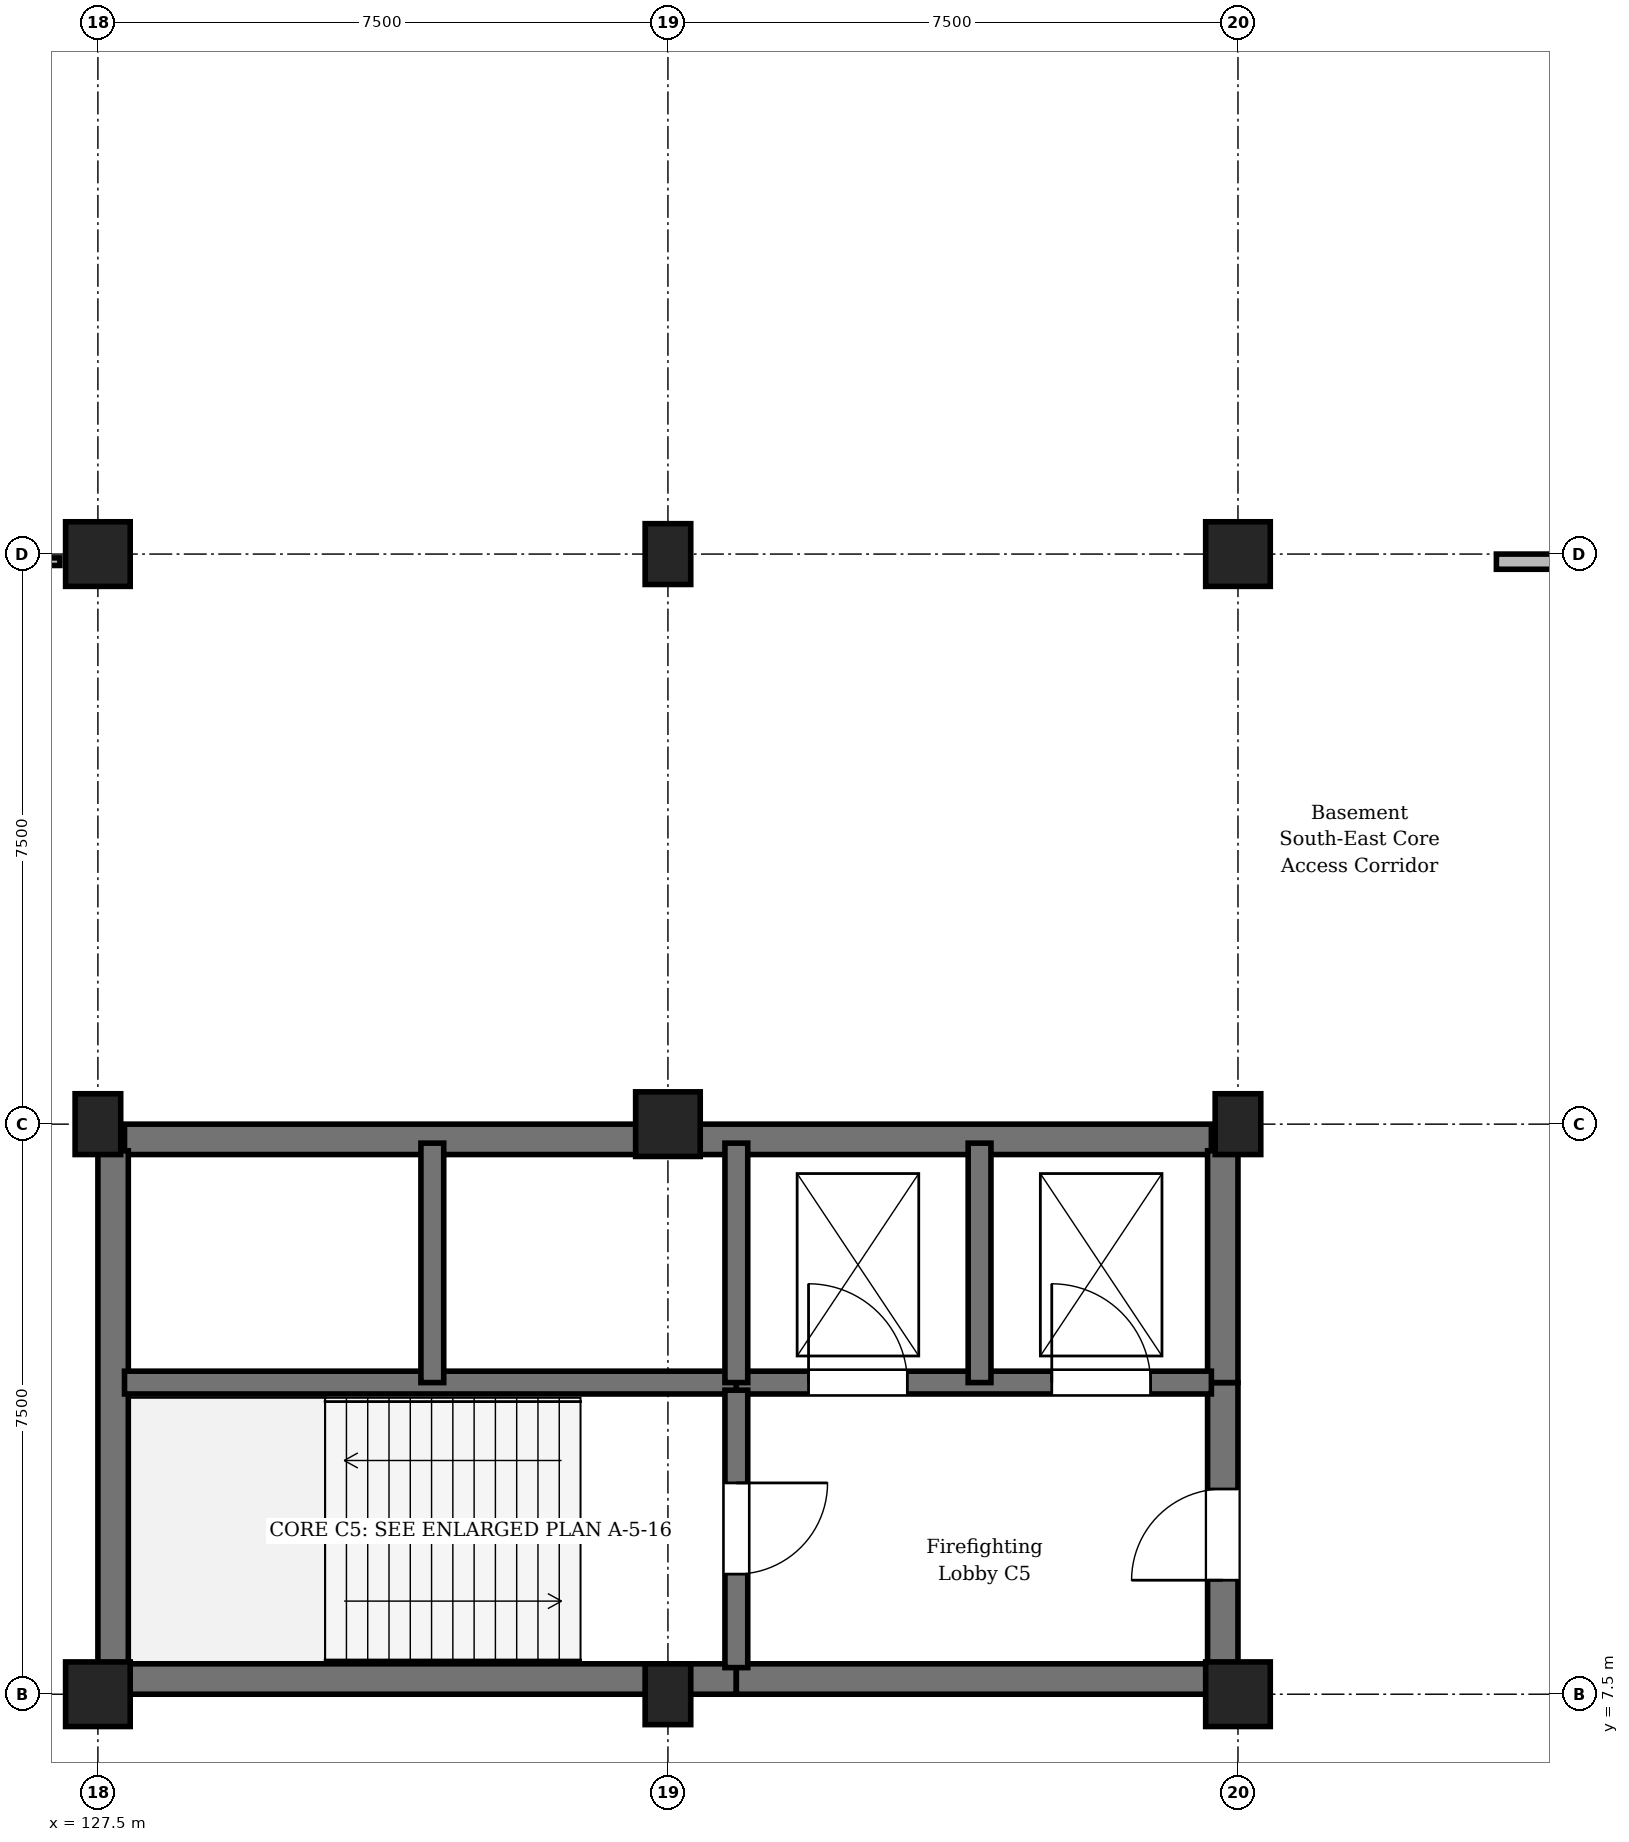
"""IFC4 building model, lengths in metres.
Left out: names, types, materials, properties, quantities, classifications, styles, units other than length and angle.
Written with IfcOpenShell. Run it as: python <this file> out.ifc"""

import sys

from ifc_helpers import new_model, si_unit, direction, frame, frame_2d, origin, origin_2d, place, context, subcontext, project, spatial, rectangle, extrude, element, fill, save


model = new_model("IFC4")
c1 = context("Model", 3, precision=1e-05, world=origin(), true_north=direction((0.0, 1.0)))
c2 = subcontext(c1, "Body", "Model", "MODEL_VIEW")
j1 = project(units=[si_unit("LENGTHUNIT", "METRE"), si_unit("PLANEANGLEUNIT", "RADIAN")], contexts=[c1])
p1 = place(None, origin())
s1 = spatial("IfcSite", under=j1, at=p1, CompositionType="ELEMENT")
p2 = place(p1, origin())
s2 = spatial("IfcBuilding", under=s1, at=p2, CompositionType="ELEMENT")
p3 = place(p2, frame((0.0, 0.0, -4.5)))
s3 = spatial("IfcBuildingStorey", under=s2, at=p3, CompositionType="ELEMENT", Elevation=-4.5)
p4 = place(p3, frame((127.5, 7.5, 0.0), z_axis=(0.0, 0.0, 1.0), x_axis=(1.0, 0.0, 0.0)))
e1 = element("IfcColumn", 1, at=p4, inside=s3, PredefinedType="COLUMN", context=c2, shape_type="SweptSolid", body=[
    extrude(rectangle(XDim=0.85, YDim=0.85, at=origin_2d()), origin(), (0.0, 0.0, 1.0), 4.5),
])
p5 = place(p3, frame((127.5, 15.0, 0.0), z_axis=(0.0, 0.0, 1.0), x_axis=(1.0, 0.0, 0.0)))
e2 = element("IfcColumn", 2, at=p5, inside=s3, PredefinedType="COLUMN", context=c2, shape_type="SweptSolid", body=[
    extrude(rectangle(XDim=0.6, YDim=0.8, at=origin_2d()), origin(), (0.0, 0.0, 1.0), 4.5),
])
p6 = place(p3, frame((127.5, 22.5, 0.0), z_axis=(0.0, 0.0, 1.0), x_axis=(1.0, 0.0, 0.0)))
e3 = element("IfcColumn", 3, at=p6, inside=s3, PredefinedType="COLUMN", context=c2, shape_type="SweptSolid", body=[
    extrude(rectangle(XDim=0.85, YDim=0.85, at=origin_2d()), origin(), (0.0, 0.0, 1.0), 4.5),
])
p7 = place(p3, frame((135.0, 7.5, 0.0), z_axis=(0.0, 0.0, 1.0), x_axis=(1.0, 0.0, 0.0)))
e4 = element("IfcColumn", 4, at=p7, inside=s3, PredefinedType="COLUMN", context=c2, shape_type="SweptSolid", body=[
    extrude(rectangle(XDim=0.6, YDim=0.8, at=origin_2d()), origin(), (0.0, 0.0, 1.0), 4.5),
])
p8 = place(p3, frame((135.0, 15.0, 0.0), z_axis=(0.0, 0.0, 1.0), x_axis=(1.0, 0.0, 0.0)))
e5 = element("IfcColumn", 5, at=p8, inside=s3, PredefinedType="COLUMN", context=c2, shape_type="SweptSolid", body=[
    extrude(rectangle(XDim=0.85, YDim=0.85, at=origin_2d()), origin(), (0.0, 0.0, 1.0), 4.5),
])
p9 = place(p3, frame((135.0, 22.5, 0.0), z_axis=(0.0, 0.0, 1.0), x_axis=(1.0, 0.0, 0.0)))
e6 = element("IfcColumn", 6, at=p9, inside=s3, PredefinedType="COLUMN", context=c2, shape_type="SweptSolid", body=[
    extrude(rectangle(XDim=0.6, YDim=0.8, at=origin_2d()), origin(), (0.0, 0.0, 1.0), 4.5),
])
p10 = place(p3, frame((142.5, 7.5, 0.0), z_axis=(0.0, 0.0, 1.0), x_axis=(1.0, 0.0, 0.0)))
e7 = element("IfcColumn", 7, at=p10, inside=s3, PredefinedType="COLUMN", context=c2, shape_type="SweptSolid", body=[
    extrude(rectangle(XDim=0.85, YDim=0.85, at=origin_2d()), origin(), (0.0, 0.0, 1.0), 4.5),
])
p11 = place(p3, frame((142.5, 15.0, 0.0), z_axis=(0.0, 0.0, 1.0), x_axis=(1.0, 0.0, 0.0)))
e8 = element("IfcColumn", 8, at=p11, inside=s3, PredefinedType="COLUMN", context=c2, shape_type="SweptSolid", body=[
    extrude(rectangle(XDim=0.6, YDim=0.8, at=origin_2d()), origin(), (0.0, 0.0, 1.0), 4.5),
])
p12 = place(p3, frame((142.5, 22.5, 0.0), z_axis=(0.0, 0.0, 1.0), x_axis=(1.0, 0.0, 0.0)))
e9 = element("IfcColumn", 9, at=p12, inside=s3, PredefinedType="COLUMN", context=c2, shape_type="SweptSolid", body=[
    extrude(rectangle(XDim=0.85, YDim=0.85, at=origin_2d()), origin(), (0.0, 0.0, 1.0), 4.5),
])
p13 = place(p3, frame((127.85, 7.7, 0.0), z_axis=(0.0, 0.0, 1.0), x_axis=(1.0, 0.0, 0.0)))
e10 = element("IfcWall", 10, at=p13, inside=s3, PredefinedType="SHEAR", context=c2, shape_type="SweptSolid", body=[
    extrude(rectangle(XDim=8.05, YDim=0.4, at=frame_2d((4.025, 0.0))), origin(), (0.0, 0.0, 1.0), 4.14),
])
p14 = place(p3, frame((135.9, 7.7, 0.0), z_axis=(0.0, 0.0, 1.0), x_axis=(1.0, 0.0, 0.0)))
e11 = element("IfcWall", 11, at=p14, inside=s3, PredefinedType="SHEAR", context=c2, shape_type="SweptSolid", body=[
    extrude(rectangle(XDim=6.25, YDim=0.4, at=frame_2d((3.125, 0.0))), origin(), (0.0, 0.0, 1.0), 4.14),
])
p15 = place(p3, frame((127.85, 14.8, 0.0), z_axis=(0.0, 0.0, 1.0), x_axis=(1.0, 0.0, 0.0)))
e12 = element("IfcWall", 12, at=p15, inside=s3, PredefinedType="SHEAR", context=c2, shape_type="SweptSolid", body=[
    extrude(rectangle(XDim=14.3, YDim=0.4, at=frame_2d((7.15, 0.0))), origin(), (0.0, 0.0, 1.0), 4.14),
])
p16 = place(p3, frame((127.7, 7.85, 0.0), z_axis=(0.0, 0.0, 1.0), x_axis=(0.0, 1.0, 0.0)))
e13 = element("IfcWall", 13, at=p16, inside=s3, PredefinedType="SHEAR", context=c2, shape_type="SweptSolid", body=[
    extrude(rectangle(XDim=6.8, YDim=0.4, at=frame_2d((3.4, 0.0))), origin(), (0.0, 0.0, 1.0), 4.14),
])
p17 = place(p3, frame((142.3, 7.85, 0.0), z_axis=(0.0, 0.0, 1.0), x_axis=(0.0, 1.0, 0.0)))
e14 = element("IfcWall", 14, at=p17, inside=s3, PredefinedType="SHEAR", context=c2, shape_type="SweptSolid", body=[
    extrude(rectangle(XDim=3.75, YDim=0.4, at=frame_2d((1.875, 0.0))), origin(), (0.0, 0.0, 1.0), 4.14),
])
p18 = place(p17, frame((1.15, 0.0, 0.0)))
e15 = element("IfcOpeningElement", 15, at=p18, cuts=e14, PredefinedType="OPENING", context=c2, shape_type="SweptSolid", body=[
    extrude(rectangle(XDim=1.2, YDim=2.25, at=frame_2d((0.6, 1.125))), frame((0.0, 0.21, 0.0), z_axis=(0.0, -1.0, 0.0), x_axis=(1.0, 0.0, 0.0)), (0.0, 0.0, 1.0), 0.42),
])
p19 = place(p3, frame((142.3, 11.6, 0.0), z_axis=(0.0, 0.0, 1.0), x_axis=(0.0, 1.0, 0.0)))
e16 = element("IfcWall", 16, at=p19, inside=s3, PredefinedType="SHEAR", context=c2, shape_type="SweptSolid", body=[
    extrude(rectangle(XDim=3.05, YDim=0.4, at=frame_2d((1.525, 0.0))), origin(), (0.0, 0.0, 1.0), 4.14),
])
p20 = place(p3, frame((127.85, 11.6, 0.0), z_axis=(0.0, 0.0, 1.0), x_axis=(1.0, 0.0, 0.0)))
e17 = element("IfcWall", 17, at=p20, inside=s3, PredefinedType="SHEAR", context=c2, shape_type="SweptSolid", body=[
    extrude(rectangle(XDim=8.05, YDim=0.3, at=frame_2d((4.025, 0.0))), origin(), (0.0, 0.0, 1.0), 4.14),
])
p21 = place(p3, frame((135.9, 11.6, 0.0), z_axis=(0.0, 0.0, 1.0), x_axis=(1.0, 0.0, 0.0)))
e18 = element("IfcWall", 18, at=p21, inside=s3, PredefinedType="SHEAR", context=c2, shape_type="SweptSolid", body=[
    extrude(rectangle(XDim=6.25, YDim=0.3, at=frame_2d((3.125, 0.0))), origin(), (0.0, 0.0, 1.0), 4.14),
])
p22 = place(p21, frame((0.95, 0.0, 0.0)))
e19 = element("IfcOpeningElement", 19, at=p22, cuts=e18, PredefinedType="OPENING", context=c2, shape_type="SweptSolid", body=[
    extrude(rectangle(XDim=1.3, YDim=2.2, at=frame_2d((0.65, 1.1))), frame((0.0, 0.16, 0.0), z_axis=(0.0, -1.0, 0.0), x_axis=(1.0, 0.0, 0.0)), (0.0, 0.0, 1.0), 0.32),
])
p23 = place(p21, frame((4.15, 0.0, 0.0)))
e20 = element("IfcOpeningElement", 20, at=p23, cuts=e18, PredefinedType="OPENING", context=c2, shape_type="SweptSolid", body=[
    extrude(rectangle(XDim=1.3, YDim=2.2, at=frame_2d((0.65, 1.1))), frame((0.0, 0.16, 0.0), z_axis=(0.0, -1.0, 0.0), x_axis=(1.0, 0.0, 0.0)), (0.0, 0.0, 1.0), 0.32),
])
p24 = place(p3, frame((135.9, 11.5, 0.0), z_axis=(0.0, 0.0, 1.0), x_axis=(0.0, -1.0, 0.0)))
e21 = element("IfcWall", 21, at=p24, inside=s3, PredefinedType="SHEAR", context=c2, shape_type="SweptSolid", body=[
    extrude(rectangle(XDim=3.65, YDim=0.3, at=frame_2d((1.825, 0.0))), origin(), (0.0, 0.0, 1.0), 4.14),
])
p25 = place(p24, frame((1.22, 0.0, 0.0)))
e22 = element("IfcOpeningElement", 22, at=p25, cuts=e21, PredefinedType="OPENING", context=c2, shape_type="SweptSolid", body=[
    extrude(rectangle(XDim=1.2, YDim=2.25, at=frame_2d((0.6, 1.125))), frame((0.0, 0.16, 0.0), z_axis=(0.0, -1.0, 0.0), x_axis=(1.0, 0.0, 0.0)), (0.0, 0.0, 1.0), 0.32),
])
for number, where, z_axis, x_axis in (
    (23, (131.9, 11.6, 0.0), (0.0, 0.0, 1.0), (0.0, 1.0, 0.0)),
    (24, (135.9, 11.6, 0.0), (0.0, 0.0, 1.0), (0.0, 1.0, 0.0)),
    (25, (139.1, 11.6, 0.0), (0.0, 0.0, 1.0), (0.0, 1.0, 0.0)),
):
    element("IfcWall", number, at=place(p3, frame(where, z_axis=z_axis, x_axis=x_axis)), inside=s3, PredefinedType="SHEAR", context=c2, shape_type="SweptSolid", body=[
        extrude(rectangle(XDim=3.15, YDim=0.3, at=frame_2d((1.575, 0.0))), origin(), (0.0, 0.0, 1.0), 4.14),
    ])
p26 = place(p3, frame((127.0, 22.4, 0.0), z_axis=(0.0, 0.0, 1.0), x_axis=(-1.0, 0.0, 0.0)))
e26 = element("IfcWall", 26, at=p26, inside=s3, PredefinedType="PARTITIONING", context=c2, shape_type="SweptSolid", body=[
    extrude(rectangle(XDim=14.0, YDim=0.1, at=frame_2d((7.0, 0.0))), origin(), (0.0, 0.0, 1.0), 3.475),
])
p27 = place(p26, frame((2.74, 0.0, 0.0)))
e27 = element("IfcOpeningElement", 27, at=p27, cuts=e26, PredefinedType="OPENING", context=c2, shape_type="SweptSolid", body=[
    extrude(rectangle(XDim=1.05, YDim=2.2, at=frame_2d((0.525, 1.1))), frame((0.0, 0.06, 0.0), z_axis=(0.0, -1.0, 0.0), x_axis=(1.0, 0.0, 0.0)), (0.0, 0.0, 1.0), 0.12),
])
p28 = place(p3, frame((172.0, 22.4, 0.0), z_axis=(0.0, 0.0, 1.0), x_axis=(-1.0, 0.0, 0.0)))
e28 = element("IfcWall", 28, at=p28, inside=s3, PredefinedType="STANDARD", context=c2, shape_type="SweptSolid", body=[
    extrude(rectangle(XDim=26.1, YDim=0.2, at=frame_2d((13.05, 0.0))), origin(), (0.0, 0.0, 1.0), 3.475),
])
p29 = place(p28, frame((2.705, 0.0, 0.0)))
e29 = element("IfcOpeningElement", 29, at=p29, cuts=e28, PredefinedType="OPENING", context=c2, shape_type="SweptSolid", body=[
    extrude(rectangle(XDim=1.05, YDim=2.2, at=frame_2d((0.525, 1.1))), frame((0.0, 0.11, 0.0), z_axis=(0.0, -1.0, 0.0), x_axis=(1.0, 0.0, 0.0)), (0.0, 0.0, 1.0), 0.22),
])
p30 = place(p18, origin())
e30 = element("IfcDoor", 30, at=p30, inside=s3, OperationType="SINGLE_SWING_LEFT", PredefinedType="DOOR", context=c2, shape_type="SweptSolid", body=[
    extrude(rectangle(XDim=1.2, YDim=2.25, at=frame_2d((0.6, 1.125))), frame((0.0, 0.025, 0.0), z_axis=(0.0, -1.0, 0.0), x_axis=(1.0, 0.0, 0.0)), (0.0, 0.0, 1.0), 0.05),
])
fill(e15, e30)
p31 = place(p22, origin())
e31 = element("IfcDoor", 31, at=p31, inside=s3, OperationType="DOUBLE_DOOR_SLIDING", PredefinedType="DOOR", context=c2, shape_type="SweptSolid", body=[
    extrude(rectangle(XDim=1.3, YDim=2.2, at=frame_2d((0.65, 1.1))), frame((0.0, 0.025, 0.0), z_axis=(0.0, -1.0, 0.0), x_axis=(1.0, 0.0, 0.0)), (0.0, 0.0, 1.0), 0.05),
])
fill(e19, e31)
p32 = place(p23, origin())
e32 = element("IfcDoor", 32, at=p32, inside=s3, OperationType="DOUBLE_DOOR_SLIDING", PredefinedType="DOOR", context=c2, shape_type="SweptSolid", body=[
    extrude(rectangle(XDim=1.3, YDim=2.2, at=frame_2d((0.65, 1.1))), frame((0.0, 0.025, 0.0), z_axis=(0.0, -1.0, 0.0), x_axis=(1.0, 0.0, 0.0)), (0.0, 0.0, 1.0), 0.05),
])
fill(e20, e32)
p33 = place(p25, origin())
e33 = element("IfcDoor", 33, at=p33, inside=s3, OperationType="SINGLE_SWING_LEFT", PredefinedType="DOOR", context=c2, shape_type="SweptSolid", body=[
    extrude(rectangle(XDim=1.2, YDim=2.25, at=frame_2d((0.6, 1.125))), frame((0.0, 0.025, 0.0), z_axis=(0.0, -1.0, 0.0), x_axis=(1.0, 0.0, 0.0)), (0.0, 0.0, 1.0), 0.05),
])
fill(e22, e33)
save(model, sys.argv[1])
